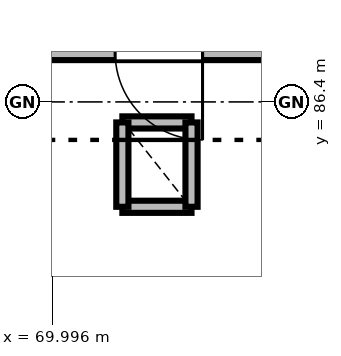
"""IFC4 building model, lengths in metres.
Left out: names, types, materials, properties, quantities, classifications, styles, units other than length and angle.
Written with IfcOpenShell. Run it as: python <this file> out.ifc"""

import sys

from ifc_helpers import new_model, si_unit, direction, frame, frame_2d, origin, place, context, subcontext, project, spatial, rectangle, extrude, element, fill, save


model = new_model("IFC4")
c1 = context("Model", 3, precision=1e-05, world=origin(), true_north=direction((0.0, 1.0)))
c2 = subcontext(c1, "Body", "Model", "MODEL_VIEW")
j1 = project(units=[si_unit("LENGTHUNIT", "METRE"), si_unit("PLANEANGLEUNIT", "RADIAN")], contexts=[c1])
p1 = place(None, origin())
s1 = spatial("IfcSite", under=j1, at=p1, CompositionType="ELEMENT")
p2 = place(p1, origin())
s2 = spatial("IfcBuilding", under=s1, at=p2, CompositionType="ELEMENT")
p3 = place(p2, frame((0.0, 0.0, 13.5)))
s3 = spatial("IfcBuildingStorey", under=s2, at=p3, CompositionType="ELEMENT", Elevation=13.5)
for number, where, z_axis, x_axis in (
    (1, (70.92, 85.02, 0.0), (0.0, 0.0, 1.0), (1.0, 0.0, 0.0)),
    (2, (71.83, 86.13, 0.0), (0.0, 0.0, 1.0), (-1.0, 0.0, 0.0)),
):
    element("IfcWall", number, at=place(p3, frame(where, z_axis=z_axis, x_axis=x_axis)), inside=s3, PredefinedType="PARTITIONING", context=c2, shape_type="SweptSolid", body=[
        extrude(rectangle(XDim=0.91, YDim=0.16, at=frame_2d((0.455, 0.0))), origin(), (0.0, 0.0, 1.0), 3.65),
    ])
for number, where, z_axis, x_axis in (
    (3, (70.92, 86.13, 0.0), (0.0, 0.0, 1.0), (0.0, -1.0, 0.0)),
    (4, (71.83, 85.02, 0.0), (0.0, 0.0, 1.0), (0.0, 1.0, 0.0)),
):
    element("IfcWall", number, at=place(p3, frame(where, z_axis=z_axis, x_axis=x_axis)), inside=s3, PredefinedType="PARTITIONING", context=c2, shape_type="SweptSolid", body=[
        extrude(rectangle(XDim=1.11, YDim=0.16, at=frame_2d((0.555, 0.0))), origin(), (0.0, 0.0, 1.0), 3.65),
    ])
p4 = place(p3, frame((72.91, 87.05, 0.0), z_axis=(0.0, 0.0, 1.0), x_axis=(-1.0, 0.0, 0.0)))
e5 = element("IfcWall", 5, at=p4, inside=s3, PredefinedType="SOLIDWALL", context=c2, shape_type="SweptSolid", body=[
    extrude(rectangle(XDim=5.71, YDim=0.2, at=frame_2d((2.855, 0.0))), origin(), (0.0, 0.0, 1.0), 3.355),
])
p5 = place(p4, frame((0.935, 0.0, 0.0)))
e6 = element("IfcOpeningElement", 6, at=p5, cuts=e5, PredefinedType="OPENING", context=c2, shape_type="SweptSolid", body=[
    extrude(rectangle(XDim=1.15, YDim=2.15, at=frame_2d((0.575, 1.075))), frame((0.0, 0.11, 0.0), z_axis=(0.0, -1.0, 0.0), x_axis=(1.0, 0.0, 0.0)), (0.0, 0.0, 1.0), 0.22),
])
p6 = place(p5, origin())
e7 = element("IfcDoor", 7, at=p6, inside=s3, OperationType="SINGLE_SWING_LEFT", PredefinedType="DOOR", context=c2, shape_type="SweptSolid", body=[
    extrude(rectangle(XDim=1.15, YDim=2.15, at=frame_2d((0.575, 1.075))), frame((0.0, 0.025, 0.0), z_axis=(0.0, -1.0, 0.0), x_axis=(1.0, 0.0, 0.0)), (0.0, 0.0, 1.0), 0.05),
])
fill(e6, e7)
save(model, sys.argv[1])
